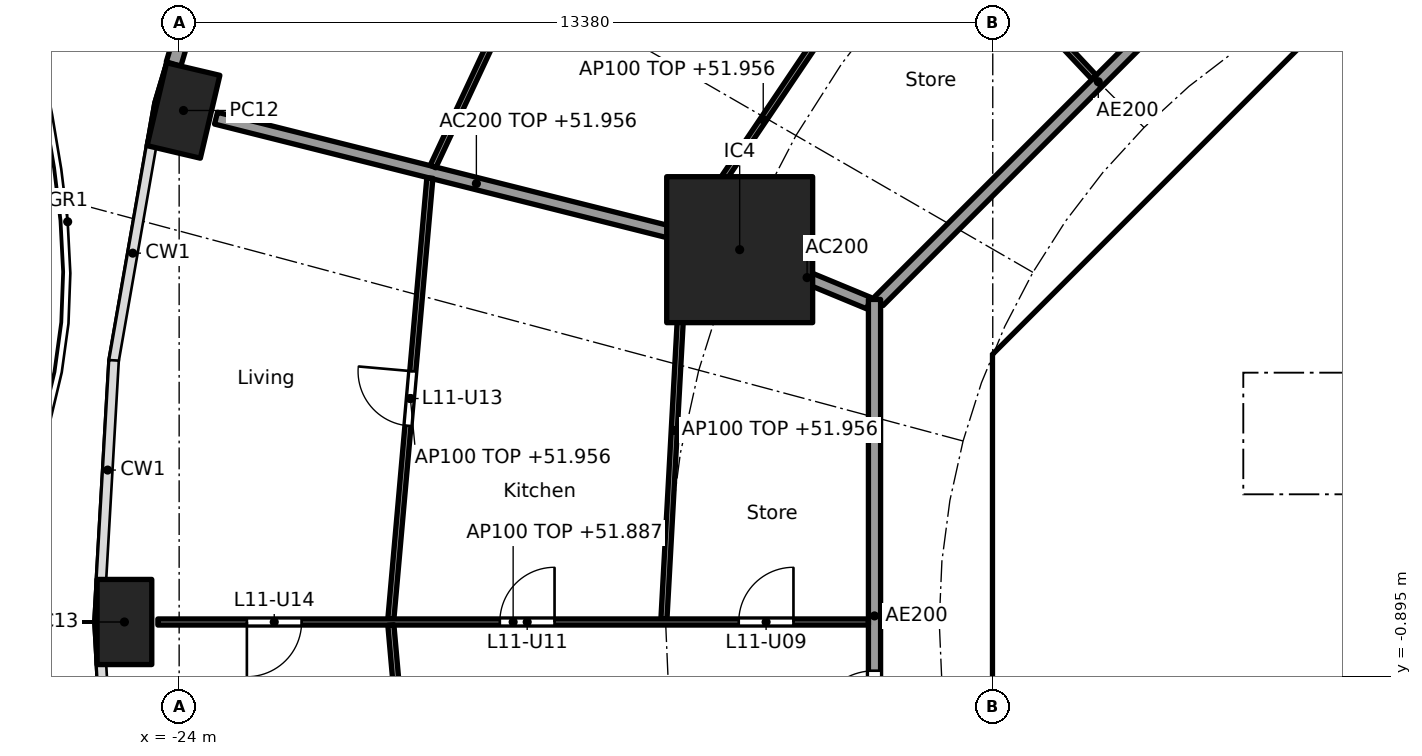
"""IFC4 building model, lengths in metres.
Left out: names, types, materials, properties, quantities, classifications, styles, units other than length and angle.
Written with IfcOpenShell. Run it as: python <this file> out.ifc"""

import sys

from ifc_helpers import new_model, si_unit, direction, frame, frame_2d, origin, origin_2d, place, context, subcontext, project, spatial, polyline, rectangle, hollow_rectangle, outline, extrude, element, fill, save


model = new_model("IFC4")
c1 = context("Model", 3, precision=1e-05, world=origin(), true_north=direction((0.0, 1.0)))
c2 = subcontext(c1, "Body", "Model", "MODEL_VIEW")
j1 = project(units=[si_unit("LENGTHUNIT", "METRE"), si_unit("PLANEANGLEUNIT", "RADIAN")], contexts=[c1])
p1 = place(None, origin())
s1 = spatial("IfcSite", under=j1, at=p1, CompositionType="ELEMENT")
p2 = place(p1, origin())
s2 = spatial("IfcBuilding", under=s1, at=p2, CompositionType="ELEMENT")
p3 = place(p2, frame((0.0, 0.0, 49.2)))
s3 = spatial("IfcBuildingStorey", under=s2, at=p3, CompositionType="ELEMENT", Elevation=49.2)
for number, where, z_axis, x_axis in (
    (1, (-23.929, 8.412, 0.0), (0.0, 0.0, 1.0), (-0.229, -0.973, 0.0)),
    (2, (-24.9, 0.0, 0.0), (0.0, 0.0, 1.0), (0.0, -1.0, 0.0)),
):
    element("IfcColumn", number, at=place(p3, frame(where, z_axis=z_axis, x_axis=x_axis)), inside=s3, PredefinedType="COLUMN", context=c2, shape_type="SweptSolid", body=[
        extrude(hollow_rectangle(XDim=1.4, YDim=0.9, WallThickness=0.05, at=origin_2d()), origin(), (0.0, 0.0, 1.0), 3.7),
    ])
p4 = place(p3, frame((-14.782, 6.123, 0.0), z_axis=(0.0, 0.0, 1.0), x_axis=(1.0, 0.0, 0.0)))
e3 = element("IfcColumn", 3, at=p4, inside=s3, PredefinedType="COLUMN", context=c2, shape_type="SweptSolid", body=[
    extrude(rectangle(XDim=2.4, YDim=2.4, at=origin_2d()), origin(), (0.0, 0.0, 1.0), 3.7),
])
p5 = place(p3, frame((-24.092, 9.176, 0.0), z_axis=(0.0, 0.0, 1.0), x_axis=(0.285871309426, 0.958268018065, 0.0)))
e4 = element("IfcWall", 4, at=p5, inside=s3, PredefinedType="SOLIDWALL", context=c2, shape_type="SweptSolid", body=[
    extrude(rectangle(XDim=3.565, YDim=0.25, at=frame_2d((1.783, 0.0))), origin(), (0.0, 0.0, 1.0), 3.44),
])
p6 = place(p5, frame((0.733, 0.0, 0.0)))
e5 = element("IfcOpeningElement", 5, at=p6, cuts=e4, PredefinedType="OPENING", context=c2, shape_type="SweptSolid", body=[
    extrude(rectangle(XDim=2.1, YDim=2.4, at=frame_2d((1.05, 1.2))), frame((0.0, 0.135, 0.0), z_axis=(0.0, -1.0, 0.0), x_axis=(1.0, 0.0, 0.0)), (0.0, 0.0, 1.0), 0.27),
])
p7 = place(p3, frame((-4.613, 9.988, 0.0), z_axis=(0.0, 0.0, 1.0), x_axis=(-0.707106781187, -0.707106781187, 0.0)))
e6 = element("IfcWall", 6, at=p7, inside=s3, PredefinedType="SHEAR", context=c2, shape_type="SweptSolid", body=[
    extrude(rectangle(XDim=7.602, YDim=0.6, at=frame_2d((3.801, 0.0))), origin(), (0.0, 0.0, 1.0), 3.44),
])
p8 = place(p7, frame((0.351, 0.0, 0.0)))
e7 = element("IfcOpeningElement", 7, at=p8, cuts=e6, PredefinedType="OPENING", context=c2, shape_type="SweptSolid", body=[
    extrude(rectangle(XDim=1.1, YDim=2.1, at=frame_2d((0.55, 1.05))), frame((0.0, 0.31, 0.0), z_axis=(0.0, -1.0, 0.0), x_axis=(1.0, 0.0, 0.0)), (0.0, 0.0, 1.0), 0.62),
])
p9 = place(p3, frame((-10.325, 3.801, 0.0), z_axis=(0.0, 0.0, 1.0), x_axis=(0.0, -1.0, 0.0)))
e8 = element("IfcWall", 8, at=p9, inside=s3, PredefinedType="SHEAR", context=c2, shape_type="SweptSolid", body=[
    extrude(rectangle(XDim=7.602, YDim=0.6, at=frame_2d((3.801, 0.0))), origin(), (0.0, 0.0, 1.0), 3.44),
])
p10 = place(p9, frame((0.651, 0.0, 0.0)))
e9 = element("IfcOpeningElement", 9, at=p10, cuts=e8, PredefinedType="OPENING", context=c2, shape_type="SweptSolid", body=[
    extrude(rectangle(XDim=1.5, YDim=2.1, at=frame_2d((0.75, 1.05))), frame((0.0, 0.31, 0.0), z_axis=(0.0, -1.0, 0.0), x_axis=(1.0, 0.0, 0.0)), (0.0, 0.0, 1.0), 0.62),
])
p11 = place(p9, frame((5.451, 0.0, 0.0)))
e10 = element("IfcOpeningElement", 10, at=p11, cuts=e8, PredefinedType="OPENING", context=c2, shape_type="SweptSolid", body=[
    extrude(rectangle(XDim=1.5, YDim=2.1, at=frame_2d((0.75, 1.05))), frame((0.0, 0.31, 0.0), z_axis=(0.0, -1.0, 0.0), x_axis=(1.0, 0.0, 0.0)), (0.0, 0.0, 1.0), 0.62),
])
p12 = place(p3, frame((-5.8, 4.3, 0.0), z_axis=(0.0, 0.0, 1.0), x_axis=(0.0, 1.0, 0.0)))
e11 = element("IfcWall", 11, at=p12, inside=s3, PredefinedType="PARTITIONING", context=c2, shape_type="SweptSolid", body=[
    extrude(rectangle(XDim=3.927, YDim=0.15, at=frame_2d((1.963, 0.0))), origin(), (0.0, 0.0, 1.0), 3.44),
])
p13 = place(p12, frame((1.551, 0.0, 0.0)))
e12 = element("IfcOpeningElement", 12, at=p13, cuts=e11, PredefinedType="OPENING", context=c2, shape_type="SweptSolid", body=[
    extrude(rectangle(XDim=0.9, YDim=2.1, at=frame_2d((0.45, 1.05))), frame((0.0, 0.085, 0.0), z_axis=(0.0, -1.0, 0.0), x_axis=(1.0, 0.0, 0.0)), (0.0, 0.0, 1.0), 0.17),
])
p14 = place(p3, frame((-6.7, 2.0, 0.0), z_axis=(0.0, 0.0, 1.0), x_axis=(1.0, 0.0, 0.0)))
e13 = element("IfcWall", 13, at=p14, inside=s3, PredefinedType="SOLIDWALL", context=c2, shape_type="SweptSolid", body=[
    extrude(rectangle(XDim=13.4, YDim=0.2, at=frame_2d((6.7, 0.0))), origin(), (0.0, 0.0, 1.0), 3.44),
])
p15 = place(p14, frame((0.65, 0.0, 0.0)))
e14 = element("IfcOpeningElement", 14, at=p15, cuts=e13, PredefinedType="OPENING", context=c2, shape_type="SweptSolid", body=[
    extrude(rectangle(XDim=1.1, YDim=2.1, at=frame_2d((0.55, 1.05))), frame((0.0, 0.11, 0.0), z_axis=(0.0, -1.0, 0.0), x_axis=(1.0, 0.0, 0.0)), (0.0, 0.0, 1.0), 0.22),
])
p16 = place(p14, frame((2.85, 0.0, 0.0)))
e15 = element("IfcOpeningElement", 15, at=p16, cuts=e13, PredefinedType="OPENING", context=c2, shape_type="SweptSolid", body=[
    extrude(rectangle(XDim=1.1, YDim=2.1, at=frame_2d((0.55, 1.05))), frame((0.0, 0.11, 0.0), z_axis=(0.0, -1.0, 0.0), x_axis=(1.0, 0.0, 0.0)), (0.0, 0.0, 1.0), 0.22),
])
p17 = place(p14, frame((5.05, 0.0, 0.0)))
e16 = element("IfcOpeningElement", 16, at=p17, cuts=e13, PredefinedType="OPENING", context=c2, shape_type="SweptSolid", body=[
    extrude(rectangle(XDim=1.1, YDim=2.1, at=frame_2d((0.55, 1.05))), frame((0.0, 0.11, 0.0), z_axis=(0.0, -1.0, 0.0), x_axis=(1.0, 0.0, 0.0)), (0.0, 0.0, 1.0), 0.22),
])
p18 = place(p3, origin())
e17 = element("IfcWall", 17, at=p18, inside=s3, PredefinedType="SHEAR", context=c2, shape_type="SweptSolid", body=[
    extrude(outline(polyline([(-10.2, 4.825), (-9.776, 4.401), (-10.025, 4.152), (-10.025, 3.801), (-10.625, 3.801), (-10.625, 4.401), (-10.2, 4.825)])), origin(), (0.0, 0.0, 1.0), 3.44),
])
p19 = place(p3, origin())
e18 = element("IfcWall", 18, at=p19, inside=s3, PredefinedType="SOLIDWALL", context=c2, shape_type="SweptSolid", body=[
    extrude(outline(polyline([(-6.5, 2.1), (-6.7, 2.1), (-6.7, 4.3), (6.7, 4.3), (6.7, 2.1), (6.5, 2.1), (6.5, 4.1), (4.5, 4.1), (4.5, 2.1), (4.3, 2.1), (4.3, 4.1), (2.3, 4.1), (2.3, 2.1), (2.1, 2.1), (2.1, 4.1), (0.1, 4.1), (0.1, 2.1), (-0.1, 2.1), (-0.1, 4.1), (-2.1, 4.1), (-2.1, 2.1), (-2.3, 2.1), (-2.3, 4.1), (-4.3, 4.1), (-4.3, 2.1), (-4.5, 2.1), (-4.5, 4.1), (-6.5, 4.1), (-6.5, 2.1)])), origin(), (0.0, 0.0, 1.0), 3.44),
])
p20 = place(p3, frame((-10.025, 4.0, 0.0), z_axis=(0.0, 0.0, 1.0), x_axis=(1.0, 0.0, 0.0)))
e19 = element("IfcWall", 19, at=p20, inside=s3, PredefinedType="PARTITIONING", context=c2, shape_type="SweptSolid", body=[
    extrude(rectangle(XDim=3.325, YDim=0.2, at=frame_2d((1.662, 0.0))), origin(), (0.0, 0.0, 1.0), 3.44),
])
p21 = place(p3, frame((-12.657, 5.243, 0.0), z_axis=(0.0, 0.0, 1.0), x_axis=(-0.923885664896, 0.382668627144, 0.0)))
e20 = element("IfcWall", 20, at=p21, inside=s3, PredefinedType="PARTITIONING", context=c2, shape_type="SweptSolid", body=[
    extrude(rectangle(XDim=2.2, YDim=0.2, at=frame_2d((1.1, 0.0))), origin(), (0.0, 0.0, 1.0), 3.44),
])
p22 = place(p3, frame((-14.831, 6.135, 0.0), z_axis=(0.0, 0.0, 1.0), x_axis=(-0.969884949569, 0.243563512454, 0.0)))
e21 = element("IfcWall", 21, at=p22, inside=s3, PredefinedType="PARTITIONING", context=c2, shape_type="SweptSolid", body=[
    extrude(rectangle(XDim=8.829, YDim=0.2, at=frame_2d((4.415, 0.0))), origin(), (0.0, 0.0, 1.0), 2.756),
])
p23 = place(p3, frame((-5.275, 12.494, 0.0), z_axis=(0.0, 0.0, 1.0), x_axis=(-0.707106781187, -0.707106781187, 0.0)))
e22 = element("IfcWall", 22, at=p23, inside=s3, PredefinedType="PARTITIONING", context=c2, shape_type="SweptSolid", body=[
    extrude(rectangle(XDim=10.209, YDim=0.2, at=frame_2d((5.104, 0.0))), origin(), (0.0, 0.0, 1.0), 3.44),
])
p24 = place(p23, frame((2.87, 0.0, 0.0)))
e23 = element("IfcOpeningElement", 23, at=p24, cuts=e22, PredefinedType="OPENING", context=c2, shape_type="SweptSolid", body=[
    extrude(rectangle(XDim=1.0, YDim=2.1, at=frame_2d((0.5, 1.05))), frame((0.0, 0.11, 0.0), z_axis=(0.0, -1.0, 0.0), x_axis=(1.0, 0.0, 0.0)), (0.0, 0.0, 1.0), 0.22),
])
p25 = place(p3, frame((-12.565, 5.304, 0.0), z_axis=(0.0, 0.0, 1.0), x_axis=(0.0, -1.0, 0.0)))
e24 = element("IfcWall", 24, at=p25, inside=s3, PredefinedType="PARTITIONING", context=c2, shape_type="SweptSolid", body=[
    extrude(rectangle(XDim=10.409, YDim=0.2, at=frame_2d((5.205, 0.0))), origin(), (0.0, 0.0, 1.0), 3.44),
])
p26 = place(p25, frame((6.106, 0.0, 0.0)))
e25 = element("IfcOpeningElement", 25, at=p26, cuts=e24, PredefinedType="OPENING", context=c2, shape_type="SweptSolid", body=[
    extrude(rectangle(XDim=1.0, YDim=2.1, at=frame_2d((0.5, 1.05))), frame((0.0, 0.11, 0.0), z_axis=(0.0, -1.0, 0.0), x_axis=(1.0, 0.0, 0.0)), (0.0, 0.0, 1.0), 0.22),
])
p27 = place(p3, frame((-8.953, 8.958, 0.0), z_axis=(0.0, 0.0, 1.0), x_axis=(-0.684574307023, 0.728943082939, 0.0)))
e26 = element("IfcWall", 26, at=p27, inside=s3, PredefinedType="PARTITIONING", context=c2, shape_type="SweptSolid", body=[
    extrude(rectangle(XDim=15.231, YDim=0.1, at=frame_2d((7.615, 0.0))), origin(), (0.0, 0.0, 1.0), 2.687),
])
p28 = place(p27, frame((1.54, 0.0, 0.0)))
e27 = element("IfcOpeningElement", 27, at=p28, cuts=e26, PredefinedType="OPENING", context=c2, shape_type="SweptSolid", body=[
    extrude(rectangle(XDim=0.9, YDim=2.1, at=frame_2d((0.45, 1.05))), frame((0.0, 0.06, 0.0), z_axis=(0.0, -1.0, 0.0), x_axis=(1.0, 0.0, 0.0)), (0.0, 0.0, 1.0), 0.12),
])
p29 = place(p27, frame((6.174, 0.0, 0.0)))
e28 = element("IfcOpeningElement", 28, at=p29, cuts=e26, PredefinedType="OPENING", context=c2, shape_type="SweptSolid", body=[
    extrude(rectangle(XDim=0.9, YDim=2.1, at=frame_2d((0.45, 1.05))), frame((0.0, 0.06, 0.0), z_axis=(0.0, -1.0, 0.0), x_axis=(1.0, 0.0, 0.0)), (0.0, 0.0, 1.0), 0.12),
])
p30 = place(p27, frame((11.8, 0.0, 0.0)))
e29 = element("IfcOpeningElement", 29, at=p30, cuts=e26, PredefinedType="OPENING", context=c2, shape_type="SweptSolid", body=[
    extrude(rectangle(XDim=0.9, YDim=2.1, at=frame_2d((0.45, 1.05))), frame((0.0, 0.06, 0.0), z_axis=(0.0, -1.0, 0.0), x_axis=(1.0, 0.0, 0.0)), (0.0, 0.0, 1.0), 0.12),
])
p31 = place(p3, frame((-13.162, 10.087, 0.0), z_axis=(0.0, 0.0, 1.0), x_axis=(-0.55912750241, -0.829081682375, 0.0)))
e30 = element("IfcWall", 30, at=p31, inside=s3, PredefinedType="PARTITIONING", context=c2, shape_type="SweptSolid", body=[
    extrude(rectangle(XDim=4.408, YDim=0.1, at=frame_2d((2.204, 0.0))), origin(), (0.0, 0.0, 1.0), 2.756),
])
p32 = place(p3, frame((-17.203, 13.095, 0.0), z_axis=(0.0, 0.0, 1.0), x_axis=(-0.423926333401, -0.905696673202, 0.0)))
e31 = element("IfcWall", 31, at=p32, inside=s3, PredefinedType="PARTITIONING", context=c2, shape_type="SweptSolid", body=[
    extrude(rectangle(XDim=6.188, YDim=0.1, at=frame_2d((3.094, 0.0))), origin(), (0.0, 0.0, 1.0), 2.756),
])
p33 = place(p3, frame((-15.688, 6.249, 0.0), z_axis=(0.0, 0.0, 1.0), x_axis=(-0.054659814056, -0.998505034903, 0.0)))
e32 = element("IfcWall", 32, at=p33, inside=s3, PredefinedType="PARTITIONING", context=c2, shape_type="SweptSolid", body=[
    extrude(rectangle(XDim=6.208, YDim=0.1, at=frame_2d((3.104, 0.0))), origin(), (0.0, 0.0, 1.0), 2.756),
])
p34 = place(p3, frame((-19.877, 7.301, 0.0), z_axis=(0.0, 0.0, 1.0), x_axis=(-0.088143415068, -0.996107794558, 0.0)))
e33 = element("IfcWall", 33, at=p34, inside=s3, PredefinedType="PARTITIONING", context=c2, shape_type="SweptSolid", body=[
    extrude(rectangle(XDim=7.279, YDim=0.1, at=frame_2d((3.64, 0.0))), origin(), (0.0, 0.0, 1.0), 2.756),
])
p35 = place(p34, frame((3.189, 0.0, 0.0)))
e34 = element("IfcOpeningElement", 34, at=p35, cuts=e33, PredefinedType="OPENING", context=c2, shape_type="SweptSolid", body=[
    extrude(rectangle(XDim=0.9, YDim=2.1, at=frame_2d((0.45, 1.05))), frame((0.0, 0.06, 0.0), z_axis=(0.0, -1.0, 0.0), x_axis=(1.0, 0.0, 0.0)), (0.0, 0.0, 1.0), 0.12),
])
p36 = place(p3, frame((-12.665, 0.0, 0.0), z_axis=(0.0, 0.0, 1.0), x_axis=(-1.0, 0.0, 0.0)))
e35 = element("IfcWall", 35, at=p36, inside=s3, PredefinedType="PARTITIONING", context=c2, shape_type="SweptSolid", body=[
    extrude(rectangle(XDim=11.685, YDim=0.1, at=frame_2d((5.843, 0.0))), origin(), (0.0, 0.0, 1.0), 2.687),
])
p37 = place(p36, frame((1.233, 0.0, 0.0)))
e36 = element("IfcOpeningElement", 36, at=p37, cuts=e35, PredefinedType="OPENING", context=c2, shape_type="SweptSolid", body=[
    extrude(rectangle(XDim=0.9, YDim=2.1, at=frame_2d((0.45, 1.05))), frame((0.0, 0.06, 0.0), z_axis=(0.0, -1.0, 0.0), x_axis=(1.0, 0.0, 0.0)), (0.0, 0.0, 1.0), 0.12),
])
p38 = place(p36, frame((5.162, 0.0, 0.0)))
e37 = element("IfcOpeningElement", 37, at=p38, cuts=e35, PredefinedType="OPENING", context=c2, shape_type="SweptSolid", body=[
    extrude(rectangle(XDim=0.9, YDim=2.1, at=frame_2d((0.45, 1.05))), frame((0.0, 0.06, 0.0), z_axis=(0.0, -1.0, 0.0), x_axis=(1.0, 0.0, 0.0)), (0.0, 0.0, 1.0), 0.12),
])
p39 = place(p36, frame((9.322, 0.0, 0.0)))
e38 = element("IfcOpeningElement", 38, at=p39, cuts=e35, PredefinedType="OPENING", context=c2, shape_type="SweptSolid", body=[
    extrude(rectangle(XDim=0.9, YDim=2.1, at=frame_2d((0.45, 1.05))), frame((0.0, 0.06, 0.0), z_axis=(0.0, -1.0, 0.0), x_axis=(1.0, 0.0, 0.0)), (0.0, 0.0, 1.0), 0.12),
])
p40 = place(p3, frame((-20.518, -0.05, 0.0), z_axis=(0.0, 0.0, 1.0), x_axis=(0.088143415068, -0.996107794558, 0.0)))
e39 = element("IfcWall", 39, at=p40, inside=s3, PredefinedType="PARTITIONING", context=c2, shape_type="SweptSolid", body=[
    extrude(rectangle(XDim=7.279, YDim=0.1, at=frame_2d((3.64, 0.0))), origin(), (0.0, 0.0, 1.0), 2.756),
])
p41 = place(p15, origin())
e40 = element("IfcDoor", 40, at=p41, inside=s3, OperationType="DOUBLE_DOOR_SLIDING", PredefinedType="DOOR", context=c2, shape_type="SweptSolid", body=[
    extrude(rectangle(XDim=1.1, YDim=2.1, at=frame_2d((0.55, 1.05))), frame((0.0, 0.025, 0.0), z_axis=(0.0, -1.0, 0.0), x_axis=(1.0, 0.0, 0.0)), (0.0, 0.0, 1.0), 0.05),
])
fill(e14, e40)
p42 = place(p13, origin())
e41 = element("IfcDoor", 41, at=p42, inside=s3, OperationType="SINGLE_SWING_LEFT", PredefinedType="DOOR", context=c2, shape_type="SweptSolid", body=[
    extrude(rectangle(XDim=0.9, YDim=2.1, at=frame_2d((0.45, 1.05))), frame((0.0, 0.025, 0.0), z_axis=(0.0, -1.0, 0.0), x_axis=(1.0, 0.0, 0.0)), (0.0, 0.0, 1.0), 0.05),
])
fill(e12, e41)
p43 = place(p10, origin())
e42 = element("IfcDoor", 42, at=p43, inside=s3, OperationType="DOUBLE_DOOR_SINGLE_SWING", PredefinedType="DOOR", context=c2, shape_type="SweptSolid", body=[
    extrude(rectangle(XDim=1.5, YDim=2.1, at=frame_2d((0.75, 1.05))), frame((0.0, 0.025, 0.0), z_axis=(0.0, -1.0, 0.0), x_axis=(1.0, 0.0, 0.0)), (0.0, 0.0, 1.0), 0.05),
])
fill(e9, e42)
p44 = place(p8, origin())
e43 = element("IfcDoor", 43, at=p44, inside=s3, OperationType="SINGLE_SWING_RIGHT", PredefinedType="DOOR", context=c2, shape_type="SweptSolid", body=[
    extrude(rectangle(XDim=1.1, YDim=2.1, at=frame_2d((0.55, 1.05))), frame((0.0, 0.025, 0.0), z_axis=(0.0, -1.0, 0.0), x_axis=(1.0, 0.0, 0.0)), (0.0, 0.0, 1.0), 0.05),
])
fill(e7, e43)
p45 = place(p26, frame((1.0, 0.0, 0.0), x_axis=(-1.0, 0.0, 0.0)))
e44 = element("IfcDoor", 44, at=p45, inside=s3, OperationType="SINGLE_SWING_LEFT", PredefinedType="DOOR", context=c2, shape_type="SweptSolid", body=[
    extrude(rectangle(XDim=1.0, YDim=2.1, at=frame_2d((0.5, 1.05))), frame((0.0, 0.025, 0.0), z_axis=(0.0, -1.0, 0.0), x_axis=(1.0, 0.0, 0.0)), (0.0, 0.0, 1.0), 0.05),
])
fill(e25, e44)
p46 = place(p37, frame((0.9, 0.0, 0.0), x_axis=(-1.0, 0.0, 0.0)))
e45 = element("IfcDoor", 45, at=p46, inside=s3, OperationType="SINGLE_SWING_RIGHT", PredefinedType="DOOR", context=c2, shape_type="SweptSolid", body=[
    extrude(rectangle(XDim=0.9, YDim=2.1, at=frame_2d((0.45, 1.05))), frame((0.0, 0.025, 0.0), z_axis=(0.0, -1.0, 0.0), x_axis=(1.0, 0.0, 0.0)), (0.0, 0.0, 1.0), 0.05),
])
fill(e36, e45)
p47 = place(p38, frame((0.9, 0.0, 0.0), x_axis=(-1.0, 0.0, 0.0)))
e46 = element("IfcDoor", 46, at=p47, inside=s3, OperationType="SINGLE_SWING_RIGHT", PredefinedType="DOOR", context=c2, shape_type="SweptSolid", body=[
    extrude(rectangle(XDim=0.9, YDim=2.1, at=frame_2d((0.45, 1.05))), frame((0.0, 0.025, 0.0), z_axis=(0.0, -1.0, 0.0), x_axis=(1.0, 0.0, 0.0)), (0.0, 0.0, 1.0), 0.05),
])
fill(e37, e46)
p48 = place(p35, frame((0.9, 0.0, 0.0), x_axis=(-1.0, 0.0, 0.0)))
e47 = element("IfcDoor", 47, at=p48, inside=s3, OperationType="SINGLE_SWING_RIGHT", PredefinedType="DOOR", context=c2, shape_type="SweptSolid", body=[
    extrude(rectangle(XDim=0.9, YDim=2.1, at=frame_2d((0.45, 1.05))), frame((0.0, 0.025, 0.0), z_axis=(0.0, -1.0, 0.0), x_axis=(1.0, 0.0, 0.0)), (0.0, 0.0, 1.0), 0.05),
])
fill(e34, e47)
p49 = place(p39, origin())
e48 = element("IfcDoor", 48, at=p49, inside=s3, OperationType="SINGLE_SWING_RIGHT", PredefinedType="DOOR", context=c2, shape_type="SweptSolid", body=[
    extrude(rectangle(XDim=0.9, YDim=2.1, at=frame_2d((0.45, 1.05))), frame((0.0, 0.025, 0.0), z_axis=(0.0, -1.0, 0.0), x_axis=(1.0, 0.0, 0.0)), (0.0, 0.0, 1.0), 0.05),
])
fill(e38, e48)
save(model, sys.argv[1])
